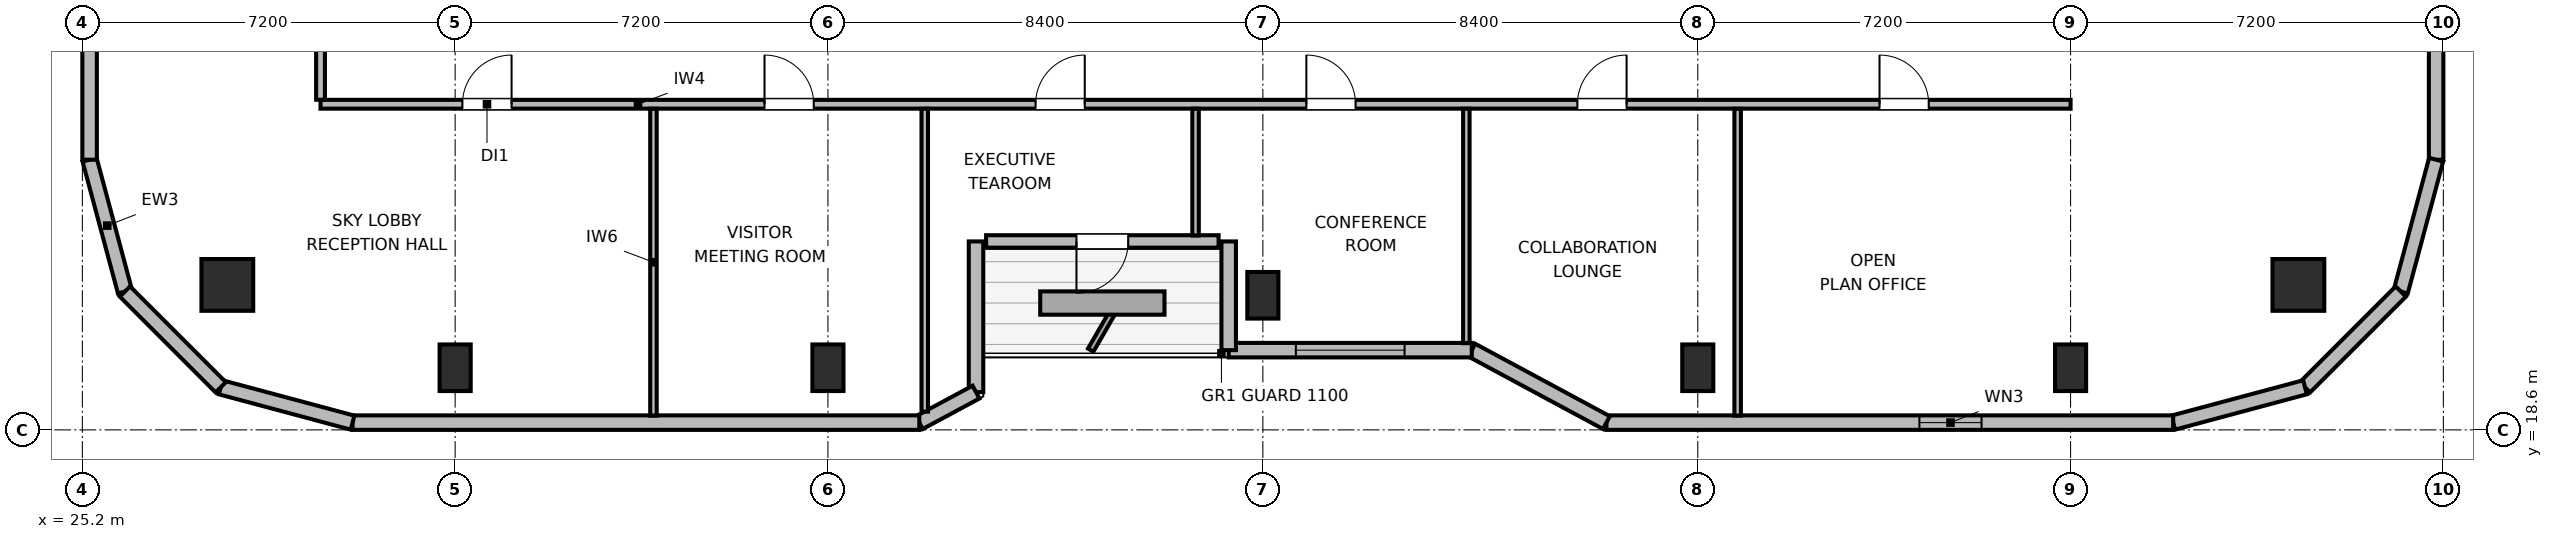
"""IFC4 building model, lengths in metres.
Left out: names, types, materials, properties, quantities, classifications, styles, units other than length and angle.
Written with IfcOpenShell. Run it as: python <this file> out.ifc"""

import sys

from ifc_helpers import new_model, si_unit, direction, frame, frame_2d, origin, origin_2d, place, context, subcontext, project, spatial, rectangle, circle, extrude, element, fill, save


model = new_model("IFC4")
c1 = context("Model", 3, precision=1e-05, world=origin(), true_north=direction((0.0, 1.0)))
c2 = subcontext(c1, "Body", "Model", "MODEL_VIEW")
j1 = project(units=[si_unit("LENGTHUNIT", "METRE"), si_unit("PLANEANGLEUNIT", "RADIAN")], contexts=[c1])
p1 = place(None, origin())
s1 = spatial("IfcSite", under=j1, at=p1, CompositionType="ELEMENT")
p2 = place(p1, origin())
s2 = spatial("IfcBuilding", under=s1, at=p2, CompositionType="ELEMENT")
p3 = place(p2, frame((0.0, 0.0, 214.8)))
s3 = spatial("IfcBuildingStorey", under=s2, at=p3, CompositionType="ELEMENT", Elevation=214.8)
for number, where, z_axis, x_axis in (
    (1, (28.0, 21.4, 0.0), (0.0, 0.0, 1.0), (1.0, 0.0, 0.0)),
    (2, (68.0, 21.4, 0.0), (0.0, 0.0, 1.0), (1.0, 0.0, 0.0)),
):
    element("IfcColumn", number, at=place(p3, frame(where, z_axis=z_axis, x_axis=x_axis)), inside=s3, PredefinedType="COLUMN", context=c2, shape_type="SweptSolid", body=[
        extrude(circle(Radius=0.5, at=origin_2d()), origin(), (0.0, 0.0, 1.0), 4.5),
    ])
for number, where, z_axis, x_axis in (
    (3, (32.4, 19.8, 0.0), (0.0, 0.0, 1.0), (1.0, 0.0, 0.0)),
    (4, (39.6, 19.8, 0.0), (0.0, 0.0, 1.0), (1.0, 0.0, 0.0)),
    (5, (48.0, 21.2, 0.0), (0.0, 0.0, 1.0), (1.0, 0.0, 0.0)),
    (6, (56.4, 19.8, 0.0), (0.0, 0.0, 1.0), (1.0, 0.0, 0.0)),
    (7, (63.6, 19.8, 0.0), (0.0, 0.0, 1.0), (1.0, 0.0, 0.0)),
):
    element("IfcColumn", number, at=place(p3, frame(where, z_axis=z_axis, x_axis=x_axis)), inside=s3, PredefinedType="COLUMN", context=c2, shape_type="SweptSolid", body=[
        extrude(rectangle(XDim=0.6, YDim=0.9, at=origin_2d()), origin(), (0.0, 0.0, 1.0), 4.5),
    ])
p4 = place(p3, frame((26.022, 21.272, 0.0), z_axis=(0.0, 0.0, 1.0), x_axis=(-0.2588904131, 0.965906700466, 0.0)))
e8 = element("IfcWall", 8, at=p4, inside=s3, PredefinedType="SOLIDWALL", context=c2, shape_type="SweptSolid", body=[
    extrude(rectangle(XDim=2.636, YDim=0.28, at=frame_2d((1.318, 0.0))), origin(), (0.0, 0.0, 1.0), 4.28),
])
p5 = place(p3, frame((25.34, 23.818, 0.0), z_axis=(0.0, 0.0, 1.0), x_axis=(0.0, 1.0, 0.0)))
e9 = element("IfcWall", 9, at=p5, inside=s3, PredefinedType="SOLIDWALL", context=c2, shape_type="SweptSolid", body=[
    extrude(rectangle(XDim=5.442, YDim=0.28, at=frame_2d((2.721, 0.0))), origin(), (0.0, 0.0, 1.0), 4.28),
])
p6 = place(p3, frame((70.66, 37.66, 0.0), z_axis=(0.0, 0.0, 1.0), x_axis=(0.0, -1.0, 0.0)))
e10 = element("IfcWall", 10, at=p6, inside=s3, PredefinedType="SOLIDWALL", context=c2, shape_type="SweptSolid", body=[
    extrude(rectangle(XDim=13.842, YDim=0.28, at=frame_2d((6.921, 0.0))), origin(), (0.0, 0.0, 1.0), 4.28),
])
p7 = place(p6, frame((5.871, 0.0, 0.85)))
e11 = element("IfcOpeningElement", 11, at=p7, cuts=e10, PredefinedType="OPENING", context=c2, shape_type="SweptSolid", body=[
    extrude(rectangle(XDim=2.1, YDim=1.05, at=frame_2d((1.05, 0.525))), frame((0.0, 0.15, 0.0), z_axis=(0.0, -1.0, 0.0), x_axis=(1.0, 0.0, 0.0)), (0.0, 0.0, 1.0), 0.3),
])
p8 = place(p3, frame((70.66, 23.818, 0.0), z_axis=(0.0, 0.0, 1.0), x_axis=(-0.2588904131, -0.965906700466, 0.0)))
e12 = element("IfcWall", 12, at=p8, inside=s3, PredefinedType="SOLIDWALL", context=c2, shape_type="SweptSolid", body=[
    extrude(rectangle(XDim=2.636, YDim=0.28, at=frame_2d((1.318, 0.0))), origin(), (0.0, 0.0, 1.0), 4.28),
])
p9 = place(p3, frame((69.978, 21.272, 0.0), z_axis=(0.0, 0.0, 1.0), x_axis=(-0.707153437963, -0.707060121331, 0.0)))
e13 = element("IfcWall", 13, at=p9, inside=s3, PredefinedType="SOLIDWALL", context=c2, shape_type="SweptSolid", body=[
    extrude(rectangle(XDim=2.616, YDim=0.28, at=frame_2d((1.308, 0.0))), origin(), (0.0, 0.0, 1.0), 4.28),
])
p10 = place(p3, frame((68.127, 19.423, 0.0), z_axis=(0.0, 0.0, 1.0), x_axis=(-0.965883534663, -0.258976828051, 0.0)))
e14 = element("IfcWall", 14, at=p10, inside=s3, PredefinedType="SOLIDWALL", context=c2, shape_type="SweptSolid", body=[
    extrude(rectangle(XDim=2.636, YDim=0.28, at=frame_2d((1.318, 0.0))), origin(), (0.0, 0.0, 1.0), 4.28),
])
p11 = place(p3, frame((65.582, 18.74, 0.0), z_axis=(0.0, 0.0, 1.0), x_axis=(-1.0, 0.0, 0.0)))
e15 = element("IfcWall", 15, at=p11, inside=s3, PredefinedType="SOLIDWALL", context=c2, shape_type="SweptSolid", body=[
    extrude(rectangle(XDim=10.946, YDim=0.28, at=frame_2d((5.473, 0.0))), origin(), (0.0, 0.0, 1.0), 4.28),
])
p12 = place(p11, frame((3.701, 0.0, 0.85)))
e16 = element("IfcOpeningElement", 16, at=p12, cuts=e15, PredefinedType="OPENING", context=c2, shape_type="SweptSolid", body=[
    extrude(rectangle(XDim=1.2, YDim=1.1, at=frame_2d((0.6, 0.55))), frame((0.0, 0.15, 0.0), z_axis=(0.0, -1.0, 0.0), x_axis=(1.0, 0.0, 0.0)), (0.0, 0.0, 1.0), 0.3),
])
p13 = place(p3, frame((54.635, 18.74, 0.0), z_axis=(0.0, 0.0, 1.0), x_axis=(-0.880473754814, 0.474094892488, 0.0)))
e17 = element("IfcWall", 17, at=p13, inside=s3, PredefinedType="SOLIDWALL", context=c2, shape_type="SweptSolid", body=[
    extrude(rectangle(XDim=2.953, YDim=0.28, at=frame_2d((1.477, 0.0))), origin(), (0.0, 0.0, 1.0), 2.865),
])
p14 = place(p3, frame((52.035, 20.14, 0.0), z_axis=(0.0, 0.0, 1.0), x_axis=(-1.0, 0.0, 0.0)))
e18 = element("IfcWall", 18, at=p14, inside=s3, PredefinedType="SOLIDWALL", context=c2, shape_type="SweptSolid", body=[
    extrude(rectangle(XDim=4.695, YDim=0.28, at=frame_2d((2.348, 0.0))), origin(), (0.0, 0.0, 1.0), 2.865),
])
p15 = place(p14, frame((1.298, 0.0, 0.85)))
e19 = element("IfcOpeningElement", 19, at=p15, cuts=e18, PredefinedType="OPENING", context=c2, shape_type="SweptSolid", body=[
    extrude(rectangle(XDim=2.1, YDim=1.05, at=frame_2d((1.05, 0.525))), frame((0.0, 0.15, 0.0), z_axis=(0.0, -1.0, 0.0), x_axis=(1.0, 0.0, 0.0)), (0.0, 0.0, 1.0), 0.3),
])
p16 = place(p3, frame((47.34, 20.14, 0.0), z_axis=(0.0, 0.0, 1.0), x_axis=(0.0, 1.0, 0.0)))
e20 = element("IfcWall", 20, at=p16, inside=s3, PredefinedType="SOLIDWALL", context=c2, shape_type="SweptSolid", body=[
    extrude(rectangle(XDim=2.1, YDim=0.28, at=frame_2d((1.05, 0.0))), origin(), (0.0, 0.0, 1.0), 2.865),
])
p17 = place(p3, frame((47.145, 22.24, 0.0), z_axis=(0.0, 0.0, 1.0), x_axis=(-1.0, 0.0, 0.0)))
e21 = element("IfcWall", 21, at=p17, inside=s3, PredefinedType="SOLIDWALL", context=c2, shape_type="SweptSolid", body=[
    extrude(rectangle(XDim=4.49, YDim=0.24, at=frame_2d((2.245, 0.0))), origin(), (0.0, 0.0, 1.0), 4.28),
])
p18 = place(p17, frame((1.745, 0.0, 0.0)))
e22 = element("IfcOpeningElement", 22, at=p18, cuts=e21, PredefinedType="OPENING", context=c2, shape_type="SweptSolid", body=[
    extrude(rectangle(XDim=1.0, YDim=2.02, at=frame_2d((0.5, 1.01))), frame((0.0, 0.13, 0.0), z_axis=(0.0, -1.0, 0.0), x_axis=(1.0, 0.0, 0.0)), (0.0, 0.0, 1.0), 0.26),
])
p19 = place(p3, frame((42.46, 22.24, 0.0), z_axis=(0.0, 0.0, 1.0), x_axis=(0.0, -1.0, 0.0)))
e23 = element("IfcWall", 23, at=p19, inside=s3, PredefinedType="SOLIDWALL", context=c2, shape_type="SweptSolid", body=[
    extrude(rectangle(XDim=2.91, YDim=0.28, at=frame_2d((1.455, 0.0))), origin(), (0.0, 0.0, 1.0), 2.865),
])
p20 = place(p3, frame((42.46, 19.33, 0.0), z_axis=(0.0, 0.0, 1.0), x_axis=(-0.880515214249, -0.474017887296, 0.0)))
e24 = element("IfcWall", 24, at=p20, inside=s3, PredefinedType="SOLIDWALL", context=c2, shape_type="SweptSolid", body=[
    extrude(rectangle(XDim=1.244, YDim=0.28, at=frame_2d((0.622, 0.0))), origin(), (0.0, 0.0, 1.0), 4.28),
])
p21 = place(p3, frame((41.365, 18.74, 0.0), z_axis=(0.0, 0.0, 1.0), x_axis=(-1.0, 0.0, 0.0)))
e25 = element("IfcWall", 25, at=p21, inside=s3, PredefinedType="SOLIDWALL", context=c2, shape_type="SweptSolid", body=[
    extrude(rectangle(XDim=10.946, YDim=0.28, at=frame_2d((5.473, 0.0))), origin(), (0.0, 0.0, 1.0), 4.28),
])
p22 = place(p3, frame((30.418, 18.74, 0.0), z_axis=(0.0, 0.0, 1.0), x_axis=(-0.965883534663, 0.258976828051, 0.0)))
e26 = element("IfcWall", 26, at=p22, inside=s3, PredefinedType="SOLIDWALL", context=c2, shape_type="SweptSolid", body=[
    extrude(rectangle(XDim=2.636, YDim=0.28, at=frame_2d((1.318, 0.0))), origin(), (0.0, 0.0, 1.0), 4.28),
])
p23 = place(p3, frame((27.873, 19.423, 0.0), z_axis=(0.0, 0.0, 1.0), x_axis=(-0.707153437963, 0.707060121331, 0.0)))
e27 = element("IfcWall", 27, at=p23, inside=s3, PredefinedType="SOLIDWALL", context=c2, shape_type="SweptSolid", body=[
    extrude(rectangle(XDim=2.616, YDim=0.28, at=frame_2d((1.308, 0.0))), origin(), (0.0, 0.0, 1.0), 4.28),
])
p24 = place(p3, frame((29.8, 24.89, 0.0), z_axis=(0.0, 0.0, 1.0), x_axis=(1.0, 0.0, 0.0)))
e28 = element("IfcWall", 28, at=p24, inside=s3, PredefinedType="PARTITIONING", context=c2, shape_type="SweptSolid", body=[
    extrude(rectangle(XDim=33.8, YDim=0.17, at=frame_2d((16.9, 0.0))), origin(), (0.0, 0.0, 1.0), 4.28),
])
p25 = place(p24, frame((2.74, 0.0, 0.0)))
e29 = element("IfcOpeningElement", 29, at=p25, cuts=e28, PredefinedType="OPENING", context=c2, shape_type="SweptSolid", body=[
    extrude(rectangle(XDim=0.95, YDim=2.04, at=frame_2d((0.475, 1.02))), frame((0.0, 0.095, 0.0), z_axis=(0.0, -1.0, 0.0), x_axis=(1.0, 0.0, 0.0)), (0.0, 0.0, 1.0), 0.19),
])
p26 = place(p24, frame((8.575, 0.0, 0.0)))
e30 = element("IfcOpeningElement", 30, at=p26, cuts=e28, PredefinedType="OPENING", context=c2, shape_type="SweptSolid", body=[
    extrude(rectangle(XDim=0.95, YDim=2.04, at=frame_2d((0.475, 1.02))), frame((0.0, 0.095, 0.0), z_axis=(0.0, -1.0, 0.0), x_axis=(1.0, 0.0, 0.0)), (0.0, 0.0, 1.0), 0.19),
])
p27 = place(p24, frame((13.81, 0.0, 0.0)))
e31 = element("IfcOpeningElement", 31, at=p27, cuts=e28, PredefinedType="OPENING", context=c2, shape_type="SweptSolid", body=[
    extrude(rectangle(XDim=0.95, YDim=2.04, at=frame_2d((0.475, 1.02))), frame((0.0, 0.095, 0.0), z_axis=(0.0, -1.0, 0.0), x_axis=(1.0, 0.0, 0.0)), (0.0, 0.0, 1.0), 0.19),
])
p28 = place(p24, frame((19.04, 0.0, 0.0)))
e32 = element("IfcOpeningElement", 32, at=p28, cuts=e28, PredefinedType="OPENING", context=c2, shape_type="SweptSolid", body=[
    extrude(rectangle(XDim=0.95, YDim=2.04, at=frame_2d((0.475, 1.02))), frame((0.0, 0.095, 0.0), z_axis=(0.0, -1.0, 0.0), x_axis=(1.0, 0.0, 0.0)), (0.0, 0.0, 1.0), 0.19),
])
p29 = place(p24, frame((24.275, 0.0, 0.0)))
e33 = element("IfcOpeningElement", 33, at=p29, cuts=e28, PredefinedType="OPENING", context=c2, shape_type="SweptSolid", body=[
    extrude(rectangle(XDim=0.95, YDim=2.04, at=frame_2d((0.475, 1.02))), frame((0.0, 0.095, 0.0), z_axis=(0.0, -1.0, 0.0), x_axis=(1.0, 0.0, 0.0)), (0.0, 0.0, 1.0), 0.19),
])
p30 = place(p24, frame((30.11, 0.0, 0.0)))
e34 = element("IfcOpeningElement", 34, at=p30, cuts=e28, PredefinedType="OPENING", context=c2, shape_type="SweptSolid", body=[
    extrude(rectangle(XDim=0.95, YDim=2.04, at=frame_2d((0.475, 1.02))), frame((0.0, 0.095, 0.0), z_axis=(0.0, -1.0, 0.0), x_axis=(1.0, 0.0, 0.0)), (0.0, 0.0, 1.0), 0.19),
])
p31 = place(p3, frame((29.8, 24.977, 0.0), z_axis=(0.0, 0.0, 1.0), x_axis=(0.0, 1.0, 0.0)))
e35 = element("IfcWall", 35, at=p31, inside=s3, PredefinedType="PARTITIONING", context=c2, shape_type="SweptSolid", body=[
    extrude(rectangle(XDim=22.046, YDim=0.17, at=frame_2d((11.023, 0.0))), origin(), (0.0, 0.0, 1.0), 4.28),
])
p32 = place(p31, frame((4.593, 0.0, 0.0)))
e36 = element("IfcOpeningElement", 36, at=p32, cuts=e35, PredefinedType="OPENING", context=c2, shape_type="SweptSolid", body=[
    extrude(rectangle(XDim=0.95, YDim=2.04, at=frame_2d((0.475, 1.02))), frame((0.0, 0.095, 0.0), z_axis=(0.0, -1.0, 0.0), x_axis=(1.0, 0.0, 0.0)), (0.0, 0.0, 1.0), 0.19),
])
p33 = place(p31, frame((15.703, 0.0, 0.0)))
e37 = element("IfcOpeningElement", 37, at=p33, cuts=e35, PredefinedType="OPENING", context=c2, shape_type="SweptSolid", body=[
    extrude(rectangle(XDim=0.95, YDim=2.04, at=frame_2d((0.475, 1.02))), frame((0.0, 0.095, 0.0), z_axis=(0.0, -1.0, 0.0), x_axis=(1.0, 0.0, 0.0)), (0.0, 0.0, 1.0), 0.19),
])
p34 = place(p3, frame((36.23, 18.875, 0.0), z_axis=(0.0, 0.0, 1.0), x_axis=(0.0, 1.0, 0.0)))
e38 = element("IfcWall", 38, at=p34, inside=s3, PredefinedType="PARTITIONING", context=c2, shape_type="SweptSolid", body=[
    extrude(rectangle(XDim=5.928, YDim=0.125, at=frame_2d((2.964, 0.0))), origin(), (0.0, 0.0, 1.0), 4.28),
])
p35 = place(p3, frame((41.47, 18.952, 0.0), z_axis=(0.0, 0.0, 1.0), x_axis=(0.0, 1.0, 0.0)))
e39 = element("IfcWall", 39, at=p35, inside=s3, PredefinedType="PARTITIONING", context=c2, shape_type="SweptSolid", body=[
    extrude(rectangle(XDim=5.851, YDim=0.125, at=frame_2d((2.926, 0.0))), origin(), (0.0, 0.0, 1.0), 3.643),
])
p36 = place(p3, frame((46.7, 22.355, 0.0), z_axis=(0.0, 0.0, 1.0), x_axis=(0.0, 1.0, 0.0)))
e40 = element("IfcWall", 40, at=p36, inside=s3, PredefinedType="PARTITIONING", context=c2, shape_type="SweptSolid", body=[
    extrude(rectangle(XDim=2.448, YDim=0.125, at=frame_2d((1.224, 0.0))), origin(), (0.0, 0.0, 1.0), 4.28),
])
p37 = place(p3, frame((51.93, 20.275, 0.0), z_axis=(0.0, 0.0, 1.0), x_axis=(0.0, 1.0, 0.0)))
e41 = element("IfcWall", 41, at=p37, inside=s3, PredefinedType="PARTITIONING", context=c2, shape_type="SweptSolid", body=[
    extrude(rectangle(XDim=4.528, YDim=0.125, at=frame_2d((2.264, 0.0))), origin(), (0.0, 0.0, 1.0), 4.28),
])
p38 = place(p3, frame((57.17, 18.875, 0.0), z_axis=(0.0, 0.0, 1.0), x_axis=(0.0, 1.0, 0.0)))
e42 = element("IfcWall", 42, at=p38, inside=s3, PredefinedType="PARTITIONING", context=c2, shape_type="SweptSolid", body=[
    extrude(rectangle(XDim=5.928, YDim=0.125, at=frame_2d((2.964, 0.0))), origin(), (0.0, 0.0, 1.0), 4.28),
])
p39 = place(p12, origin())
e43 = element("IfcWindow", 43, at=p39, inside=s3, PartitioningType="SINGLE_PANEL", PredefinedType="WINDOW", context=c2, shape_type="SweptSolid", body=[
    extrude(rectangle(XDim=1.2, YDim=1.1, at=frame_2d((0.6, 0.55))), frame((0.0, 0.03, 0.0), z_axis=(0.0, -1.0, 0.0), x_axis=(1.0, 0.0, 0.0)), (0.0, 0.0, 1.0), 0.06),
])
fill(e16, e43)
p40 = place(p15, origin())
e44 = element("IfcWindow", 44, at=p40, inside=s3, PartitioningType="SINGLE_PANEL", PredefinedType="WINDOW", context=c2, shape_type="SweptSolid", body=[
    extrude(rectangle(XDim=2.1, YDim=1.05, at=frame_2d((1.05, 0.525))), frame((0.0, 0.03, 0.0), z_axis=(0.0, -1.0, 0.0), x_axis=(1.0, 0.0, 0.0)), (0.0, 0.0, 1.0), 0.06),
])
fill(e19, e44)
p41 = place(p18, origin())
e45 = element("IfcDoor", 45, at=p41, inside=s3, OperationType="SINGLE_SWING_RIGHT", PredefinedType="DOOR", context=c2, shape_type="SweptSolid", body=[
    extrude(rectangle(XDim=1.0, YDim=2.02, at=frame_2d((0.5, 1.01))), frame((0.0, 0.025, 0.0), z_axis=(0.0, -1.0, 0.0), x_axis=(1.0, 0.0, 0.0)), (0.0, 0.0, 1.0), 0.05),
])
fill(e22, e45)
p42 = place(p25, origin())
e46 = element("IfcDoor", 46, at=p42, inside=s3, OperationType="SINGLE_SWING_RIGHT", PredefinedType="DOOR", context=c2, shape_type="SweptSolid", body=[
    extrude(rectangle(XDim=0.95, YDim=2.04, at=frame_2d((0.475, 1.02))), frame((0.0, 0.025, 0.0), z_axis=(0.0, -1.0, 0.0), x_axis=(1.0, 0.0, 0.0)), (0.0, 0.0, 1.0), 0.05),
])
fill(e29, e46)
p43 = place(p26, origin())
e47 = element("IfcDoor", 47, at=p43, inside=s3, OperationType="SINGLE_SWING_LEFT", PredefinedType="DOOR", context=c2, shape_type="SweptSolid", body=[
    extrude(rectangle(XDim=0.95, YDim=2.04, at=frame_2d((0.475, 1.02))), frame((0.0, 0.025, 0.0), z_axis=(0.0, -1.0, 0.0), x_axis=(1.0, 0.0, 0.0)), (0.0, 0.0, 1.0), 0.05),
])
fill(e30, e47)
p44 = place(p27, origin())
e48 = element("IfcDoor", 48, at=p44, inside=s3, OperationType="SINGLE_SWING_RIGHT", PredefinedType="DOOR", context=c2, shape_type="SweptSolid", body=[
    extrude(rectangle(XDim=0.95, YDim=2.04, at=frame_2d((0.475, 1.02))), frame((0.0, 0.025, 0.0), z_axis=(0.0, -1.0, 0.0), x_axis=(1.0, 0.0, 0.0)), (0.0, 0.0, 1.0), 0.05),
])
fill(e31, e48)
p45 = place(p28, origin())
e49 = element("IfcDoor", 49, at=p45, inside=s3, OperationType="SINGLE_SWING_LEFT", PredefinedType="DOOR", context=c2, shape_type="SweptSolid", body=[
    extrude(rectangle(XDim=0.95, YDim=2.04, at=frame_2d((0.475, 1.02))), frame((0.0, 0.025, 0.0), z_axis=(0.0, -1.0, 0.0), x_axis=(1.0, 0.0, 0.0)), (0.0, 0.0, 1.0), 0.05),
])
fill(e32, e49)
p46 = place(p29, origin())
e50 = element("IfcDoor", 50, at=p46, inside=s3, OperationType="SINGLE_SWING_RIGHT", PredefinedType="DOOR", context=c2, shape_type="SweptSolid", body=[
    extrude(rectangle(XDim=0.95, YDim=2.04, at=frame_2d((0.475, 1.02))), frame((0.0, 0.025, 0.0), z_axis=(0.0, -1.0, 0.0), x_axis=(1.0, 0.0, 0.0)), (0.0, 0.0, 1.0), 0.05),
])
fill(e33, e50)
p47 = place(p30, origin())
e51 = element("IfcDoor", 51, at=p47, inside=s3, OperationType="SINGLE_SWING_LEFT", PredefinedType="DOOR", context=c2, shape_type="SweptSolid", body=[
    extrude(rectangle(XDim=0.95, YDim=2.04, at=frame_2d((0.475, 1.02))), frame((0.0, 0.025, 0.0), z_axis=(0.0, -1.0, 0.0), x_axis=(1.0, 0.0, 0.0)), (0.0, 0.0, 1.0), 0.05),
])
fill(e34, e51)
save(model, sys.argv[1])
